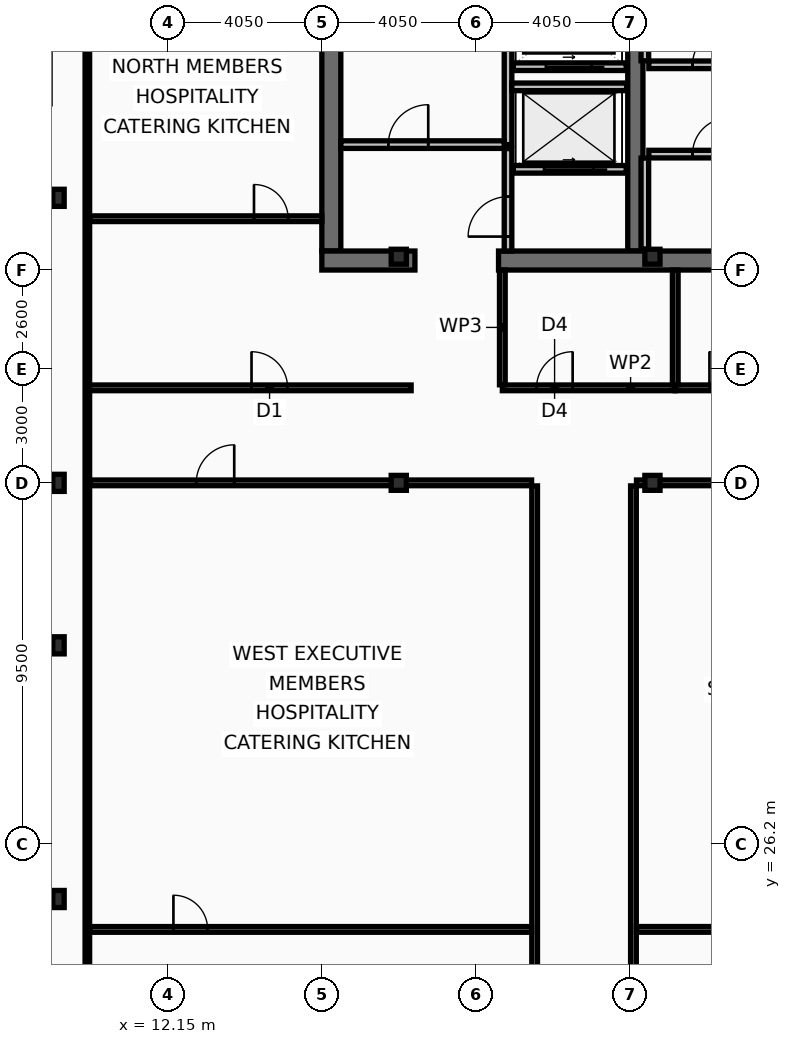
"""IFC4 building model, lengths in metres.
Left out: names, types, materials, properties, quantities, classifications, styles, units other than length and angle.
Written with IfcOpenShell. Run it as: python <this file> out.ifc"""

import sys

from ifc_helpers import new_model, si_unit, direction, frame, frame_2d, origin, origin_2d, place, context, subcontext, project, spatial, rectangle, i_section, extrude, element, fill, save


model = new_model("IFC4")
c1 = context("Model", 3, precision=1e-05, world=origin(), true_north=direction((0.0, 1.0)))
c2 = subcontext(c1, "Body", "Model", "MODEL_VIEW")
j1 = project(units=[si_unit("LENGTHUNIT", "METRE"), si_unit("PLANEANGLEUNIT", "RADIAN")], contexts=[c1])
p1 = place(None, origin())
s1 = spatial("IfcSite", under=j1, at=p1, CompositionType="ELEMENT")
p2 = place(p1, origin())
s2 = spatial("IfcBuilding", under=s1, at=p2, CompositionType="ELEMENT")
p3 = place(p2, frame((0.0, 0.0, 277.0)))
s3 = spatial("IfcBuildingStorey", under=s2, at=p3, CompositionType="ELEMENT", Elevation=277.0)
p4 = place(p3, frame((16.45, 41.8, 0.0), z_axis=(0.0, 0.0, 1.0), x_axis=(0.0, 1.0, 0.0)))
e1 = element("IfcWall", 1, at=p4, inside=s3, PredefinedType="SHEAR", context=c2, shape_type="SweptSolid", body=[
    extrude(rectangle(XDim=11.4, YDim=0.5, at=frame_2d((5.7, 0.0))), origin(), (0.0, 0.0, 1.0), 3.44),
])
p5 = place(p3, frame((24.45, 41.8, 0.0), z_axis=(0.0, 0.0, 1.0), x_axis=(0.0, 1.0, 0.0)))
e2 = element("IfcWall", 2, at=p5, inside=s3, PredefinedType="SHEAR", context=c2, shape_type="SweptSolid", body=[
    extrude(rectangle(XDim=11.4, YDim=0.4, at=frame_2d((5.7, 0.0))), origin(), (0.0, 0.0, 1.0), 3.44),
])
p6 = place(p3, frame((18.65, 41.55, 0.0), z_axis=(0.0, 0.0, 1.0), x_axis=(-1.0, 0.0, 0.0)))
e3 = element("IfcWall", 3, at=p6, inside=s3, PredefinedType="SHEAR", context=c2, shape_type="SweptSolid", body=[
    extrude(rectangle(XDim=2.45, YDim=0.5, at=frame_2d((1.225, 0.0))), origin(), (0.0, 0.0, 1.0), 3.44),
])
p7 = place(p3, frame((32.3, 41.55, 0.0), z_axis=(0.0, 0.0, 1.0), x_axis=(-1.0, 0.0, 0.0)))
e4 = element("IfcWall", 4, at=p7, inside=s3, PredefinedType="SHEAR", context=c2, shape_type="SweptSolid", body=[
    extrude(rectangle(XDim=11.45, YDim=0.5, at=frame_2d((5.725, 0.0))), origin(), (0.0, 0.0, 1.0), 3.44),
])
for number, where, z_axis, x_axis in (
    (5, (9.27, 24.75, 0.0), (0.0, 0.0, 1.0), (1.0, 0.0, 0.0)),
    (6, (9.27, 31.425, 0.0), (0.0, 0.0, 1.0), (1.0, 0.0, 0.0)),
    (7, (9.27, 35.7, 0.0), (0.0, 0.0, 1.0), (1.0, 0.0, 0.0)),
    (8, (9.27, 43.2, 0.0), (0.0, 0.0, 1.0), (1.0, 0.0, 0.0)),
):
    element("IfcColumn", number, at=place(p3, frame(where, z_axis=z_axis, x_axis=x_axis)), inside=s3, PredefinedType="COLUMN", context=c2, shape_type="SweptSolid", body=[
        extrude(i_section(OverallWidth=0.3, OverallDepth=0.45, WebThickness=0.014, FlangeThickness=0.026, at=origin_2d()), origin(), (0.0, 0.0, 1.0), 3.6),
    ])
for number, where, z_axis, x_axis in (
    (9, (18.225, 35.7, 0.0), (0.0, 0.0, 1.0), (1.0, 0.0, 0.0)),
    (10, (18.225, 41.65, 0.0), (0.0, 0.0, 1.0), (1.0, 0.0, 0.0)),
    (11, (24.9, 35.7, 0.0), (0.0, 0.0, 1.0), (1.0, 0.0, 0.0)),
    (12, (24.9, 41.65, 0.0), (0.0, 0.0, 1.0), (1.0, 0.0, 0.0)),
):
    element("IfcColumn", number, at=place(p3, frame(where, z_axis=z_axis, x_axis=x_axis)), inside=s3, PredefinedType="COLUMN", context=c2, shape_type="SweptSolid", body=[
        extrude(i_section(OverallWidth=0.399, OverallDepth=0.393, WebThickness=0.023, FlangeThickness=0.037, at=origin_2d()), origin(), (0.0, 0.0, 1.0), 3.6),
    ])
p8 = place(p3, frame((24.21, 43.95, 0.0), z_axis=(0.0, 0.0, 1.0), x_axis=(-1.0, 0.0, 0.0)))
e13 = element("IfcWall", 13, at=p8, inside=s3, PredefinedType="PARTITIONING", context=c2, shape_type="SweptSolid", body=[
    extrude(rectangle(XDim=2.97, YDim=0.2, at=frame_2d((1.485, 0.0))), origin(), (0.0, 0.0, 1.0), 3.44),
])
p9 = place(p8, frame((0.86, 0.0, 0.0)))
e14 = element("IfcOpeningElement", 14, at=p9, cuts=e13, PredefinedType="OPENING", context=c2, shape_type="SweptSolid", body=[
    extrude(rectangle(XDim=1.3, YDim=2.18, at=frame_2d((0.65, 1.09))), frame((0.0, 0.11, 0.0), z_axis=(0.0, -1.0, 0.0), x_axis=(1.0, 0.0, 0.0)), (0.0, 0.0, 1.0), 0.22),
])
p10 = place(p3, frame((24.21, 46.65, 0.0), z_axis=(0.0, 0.0, 1.0), x_axis=(-1.0, 0.0, 0.0)))
e15 = element("IfcWall", 15, at=p10, inside=s3, PredefinedType="PARTITIONING", context=c2, shape_type="SweptSolid", body=[
    extrude(rectangle(XDim=2.97, YDim=0.2, at=frame_2d((1.485, 0.0))), origin(), (0.0, 0.0, 1.0), 3.44),
])
p11 = place(p10, frame((0.91, 0.0, 0.0)))
e16 = element("IfcOpeningElement", 16, at=p11, cuts=e15, PredefinedType="OPENING", context=c2, shape_type="SweptSolid", body=[
    extrude(rectangle(XDim=1.2, YDim=2.18, at=frame_2d((0.6, 1.09))), frame((0.0, 0.11, 0.0), z_axis=(0.0, -1.0, 0.0), x_axis=(1.0, 0.0, 0.0)), (0.0, 0.0, 1.0), 0.22),
])
p12 = place(p3, frame((21.1, 44.6, 0.0), z_axis=(0.0, 0.0, 1.0), x_axis=(0.0, 1.0, 0.0)))
e17 = element("IfcWall", 17, at=p12, inside=s3, PredefinedType="PARTITIONING", context=c2, shape_type="SweptSolid", body=[
    extrude(rectangle(XDim=4.3, YDim=0.2, at=frame_2d((2.15, 0.0))), origin(), (0.0, 0.0, 1.0), 3.44),
])
p13 = place(p3, frame((16.7, 44.6, 0.0), z_axis=(0.0, 0.0, 1.0), x_axis=(1.0, 0.0, 0.0)))
e18 = element("IfcWall", 18, at=p13, inside=s3, PredefinedType="PARTITIONING", context=c2, shape_type="SweptSolid", body=[
    extrude(rectangle(XDim=4.3, YDim=0.2, at=frame_2d((2.15, 0.0))), origin(), (0.0, 0.0, 1.0), 3.44),
])
p14 = place(p13, frame((1.25, 0.0, 0.0)))
e19 = element("IfcOpeningElement", 19, at=p14, cuts=e18, PredefinedType="OPENING", context=c2, shape_type="SweptSolid", body=[
    extrude(rectangle(XDim=1.05, YDim=2.15, at=frame_2d((0.525, 1.075))), frame((0.0, 0.11, 0.0), z_axis=(0.0, -1.0, 0.0), x_axis=(1.0, 0.0, 0.0)), (0.0, 0.0, 1.0), 0.22),
])
p15 = place(p3, frame((21.2, 46.12, 0.0), z_axis=(0.0, 0.0, 1.0), x_axis=(1.0, 0.0, 0.0)))
e20 = element("IfcWall", 20, at=p15, inside=s3, PredefinedType="PARTITIONING", context=c2, shape_type="SweptSolid", body=[
    extrude(rectangle(XDim=3.02, YDim=0.2, at=frame_2d((1.51, 0.0))), origin(), (0.0, 0.0, 1.0), 3.44),
])
p16 = place(p3, frame((21.1, 41.8, 0.0), z_axis=(0.0, 0.0, 1.0), x_axis=(0.0, 1.0, 0.0)))
e21 = element("IfcWall", 21, at=p16, inside=s3, PredefinedType="PARTITIONING", context=c2, shape_type="SweptSolid", body=[
    extrude(rectangle(XDim=2.695, YDim=0.2, at=frame_2d((1.348, 0.0))), origin(), (0.0, 0.0, 1.0), 3.44),
])
p17 = place(p16, frame((0.38, 0.0, 0.0)))
e22 = element("IfcOpeningElement", 22, at=p17, cuts=e21, PredefinedType="OPENING", context=c2, shape_type="SweptSolid", body=[
    extrude(rectangle(XDim=1.05, YDim=2.15, at=frame_2d((0.525, 1.075))), frame((0.0, 0.11, 0.0), z_axis=(0.0, -1.0, 0.0), x_axis=(1.0, 0.0, 0.0)), (0.0, 0.0, 1.0), 0.22),
])
p18 = place(p3, frame((24.7, 46.805, 0.0), z_axis=(0.0, 0.0, 1.0), x_axis=(0.0, 1.0, 0.0)))
e23 = element("IfcWall", 23, at=p18, inside=s3, PredefinedType="PARTITIONING", context=c2, shape_type="SweptSolid", body=[
    extrude(rectangle(XDim=5.99, YDim=0.2, at=frame_2d((2.995, 0.0))), origin(), (0.0, 0.0, 1.0), 3.44),
])
p19 = place(p3, frame((24.805, 46.7, 0.0), z_axis=(0.0, 0.0, 1.0), x_axis=(1.0, 0.0, 0.0)))
e24 = element("IfcWall", 24, at=p19, inside=s3, PredefinedType="PARTITIONING", context=c2, shape_type="SweptSolid", body=[
    extrude(rectangle(XDim=7.51, YDim=0.2, at=frame_2d((3.755, 0.0))), origin(), (0.0, 0.0, 1.0), 3.44),
])
p20 = place(p19, frame((1.15, 0.0, 0.0)))
e25 = element("IfcOpeningElement", 25, at=p20, cuts=e24, PredefinedType="OPENING", context=c2, shape_type="SweptSolid", body=[
    extrude(rectangle(XDim=0.95, YDim=2.1, at=frame_2d((0.475, 1.05))), frame((0.0, 0.11, 0.0), z_axis=(0.0, -1.0, 0.0), x_axis=(1.0, 0.0, 0.0)), (0.0, 0.0, 1.0), 0.22),
])
p21 = place(p19, frame((5.336, 0.0, 0.0)))
e26 = element("IfcOpeningElement", 26, at=p21, cuts=e24, PredefinedType="OPENING", context=c2, shape_type="SweptSolid", body=[
    extrude(rectangle(XDim=0.95, YDim=2.1, at=frame_2d((0.475, 1.05))), frame((0.0, 0.11, 0.0), z_axis=(0.0, -1.0, 0.0), x_axis=(1.0, 0.0, 0.0)), (0.0, 0.0, 1.0), 0.22),
])
p22 = place(p3, frame((24.7, 41.85, 0.0), z_axis=(0.0, 0.0, 1.0), x_axis=(0.0, 1.0, 0.0)))
e27 = element("IfcWall", 27, at=p22, inside=s3, PredefinedType="PARTITIONING", context=c2, shape_type="SweptSolid", body=[
    extrude(rectangle(XDim=2.395, YDim=0.2, at=frame_2d((1.198, 0.0))), origin(), (0.0, 0.0, 1.0), 3.44),
])
p23 = place(p3, frame((24.805, 44.35, 0.0), z_axis=(0.0, 0.0, 1.0), x_axis=(1.0, 0.0, 0.0)))
e28 = element("IfcWall", 28, at=p23, inside=s3, PredefinedType="PARTITIONING", context=c2, shape_type="SweptSolid", body=[
    extrude(rectangle(XDim=7.34, YDim=0.2, at=frame_2d((3.67, 0.0))), origin(), (0.0, 0.0, 1.0), 3.44),
])
p24 = place(p23, frame((1.15, 0.0, 0.0)))
e29 = element("IfcOpeningElement", 29, at=p24, cuts=e28, PredefinedType="OPENING", context=c2, shape_type="SweptSolid", body=[
    extrude(rectangle(XDim=0.95, YDim=2.1, at=frame_2d((0.475, 1.05))), frame((0.0, 0.11, 0.0), z_axis=(0.0, -1.0, 0.0), x_axis=(1.0, 0.0, 0.0)), (0.0, 0.0, 1.0), 0.22),
])
p25 = place(p23, frame((5.231, 0.0, 0.0)))
e30 = element("IfcOpeningElement", 30, at=p25, cuts=e28, PredefinedType="OPENING", context=c2, shape_type="SweptSolid", body=[
    extrude(rectangle(XDim=0.95, YDim=2.1, at=frame_2d((0.475, 1.05))), frame((0.0, 0.11, 0.0), z_axis=(0.0, -1.0, 0.0), x_axis=(1.0, 0.0, 0.0)), (0.0, 0.0, 1.0), 0.22),
])
p26 = place(p3, frame((20.95, 38.2, 0.0), z_axis=(0.0, 0.0, 1.0), x_axis=(1.0, 0.0, 0.0)))
e31 = element("IfcWall", 31, at=p26, inside=s3, PredefinedType="PARTITIONING", context=c2, shape_type="SweptSolid", body=[
    extrude(rectangle(XDim=4.55, YDim=0.15, at=frame_2d((2.275, 0.0))), origin(), (0.0, 0.0, 1.0), 2.78),
])
p27 = place(p26, frame((0.9, 0.0, 0.0)))
e32 = element("IfcOpeningElement", 32, at=p27, cuts=e31, PredefinedType="OPENING", context=c2, shape_type="SweptSolid", body=[
    extrude(rectangle(XDim=0.95, YDim=2.05, at=frame_2d((0.475, 1.025))), frame((0.0, 0.085, 0.0), z_axis=(0.0, -1.0, 0.0), x_axis=(1.0, 0.0, 0.0)), (0.0, 0.0, 1.0), 0.17),
])
p28 = place(p3, frame((25.5, 38.2, 0.0), z_axis=(0.0, 0.0, 1.0), x_axis=(1.0, 0.0, 0.0)))
e33 = element("IfcWall", 33, at=p28, inside=s3, PredefinedType="PARTITIONING", context=c2, shape_type="SweptSolid", body=[
    extrude(rectangle(XDim=2.9, YDim=0.15, at=frame_2d((1.45, 0.0))), origin(), (0.0, 0.0, 1.0), 3.44),
])
p29 = place(p28, frame((0.9, 0.0, 0.0)))
e34 = element("IfcOpeningElement", 34, at=p29, cuts=e33, PredefinedType="OPENING", context=c2, shape_type="SweptSolid", body=[
    extrude(rectangle(XDim=0.95, YDim=2.05, at=frame_2d((0.475, 1.025))), frame((0.0, 0.085, 0.0), z_axis=(0.0, -1.0, 0.0), x_axis=(1.0, 0.0, 0.0)), (0.0, 0.0, 1.0), 0.17),
])
for number, where, z_axis, x_axis in (
    (35, (20.95, 38.28, 0.0), (0.0, 0.0, 1.0), (0.0, 1.0, 0.0)),
    (36, (25.5, 38.28, 0.0), (0.0, 0.0, 1.0), (0.0, 1.0, 0.0)),
):
    element("IfcWall", number, at=place(p3, frame(where, z_axis=z_axis, x_axis=x_axis)), inside=s3, PredefinedType="PARTITIONING", context=c2, shape_type="SweptSolid", body=[
        extrude(rectangle(XDim=3.02, YDim=0.15, at=frame_2d((1.51, 0.0))), origin(), (0.0, 0.0, 1.0), 3.44),
    ])
p30 = place(p3, frame((10.03, 38.2, 0.0), z_axis=(0.0, 0.0, 1.0), x_axis=(1.0, 0.0, 0.0)))
e37 = element("IfcWall", 37, at=p30, inside=s3, PredefinedType="PARTITIONING", context=c2, shape_type="SweptSolid", body=[
    extrude(rectangle(XDim=8.52, YDim=0.15, at=frame_2d((4.26, 0.0))), origin(), (0.0, 0.0, 1.0), 2.78),
])
p31 = place(p30, frame((4.32, 0.0, 0.0)))
e38 = element("IfcOpeningElement", 38, at=p31, cuts=e37, PredefinedType="OPENING", context=c2, shape_type="SweptSolid", body=[
    extrude(rectangle(XDim=0.95, YDim=2.05, at=frame_2d((0.475, 1.025))), frame((0.0, 0.085, 0.0), z_axis=(0.0, -1.0, 0.0), x_axis=(1.0, 0.0, 0.0)), (0.0, 0.0, 1.0), 0.17),
])
p32 = place(p3, frame((10.095, 42.65, 0.0), z_axis=(0.0, 0.0, 1.0), x_axis=(1.0, 0.0, 0.0)))
e39 = element("IfcWall", 39, at=p32, inside=s3, PredefinedType="PARTITIONING", context=c2, shape_type="SweptSolid", body=[
    extrude(rectangle(XDim=6.105, YDim=0.15, at=frame_2d((3.052, 0.0))), origin(), (0.0, 0.0, 1.0), 2.78),
])
p33 = place(p32, frame((4.32, 0.0, 0.0)))
e40 = element("IfcOpeningElement", 40, at=p33, cuts=e39, PredefinedType="OPENING", context=c2, shape_type="SweptSolid", body=[
    extrude(rectangle(XDim=0.9, YDim=2.05, at=frame_2d((0.45, 1.025))), frame((0.0, 0.085, 0.0), z_axis=(0.0, -1.0, 0.0), x_axis=(1.0, 0.0, 0.0)), (0.0, 0.0, 1.0), 0.17),
])
p34 = place(p3, frame((21.8, 10.665, 0.0), z_axis=(0.0, 0.0, 1.0), x_axis=(0.0, 1.0, 0.0)))
e41 = element("IfcWall", 41, at=p34, inside=s3, PredefinedType="PARTITIONING", context=c2, shape_type="SweptSolid", body=[
    extrude(rectangle(XDim=24.955, YDim=0.15, at=frame_2d((12.478, 0.0))), origin(), (0.0, 0.0, 1.0), 3.03),
])
p35 = place(p34, frame((3.4, 0.0, 0.0)))
e42 = element("IfcOpeningElement", 42, at=p35, cuts=e41, PredefinedType="OPENING", context=c2, shape_type="SweptSolid", body=[
    extrude(rectangle(XDim=1.1, YDim=2.1, at=frame_2d((0.55, 1.05))), frame((0.0, 0.085, 0.0), z_axis=(0.0, -1.0, 0.0), x_axis=(1.0, 0.0, 0.0)), (0.0, 0.0, 1.0), 0.17),
])
p36 = place(p3, frame((10.095, 35.7, 0.0), z_axis=(0.0, 0.0, 1.0), x_axis=(1.0, 0.0, 0.0)))
e43 = element("IfcWall", 43, at=p36, inside=s3, PredefinedType="PARTITIONING", context=c2, shape_type="SweptSolid", body=[
    extrude(rectangle(XDim=11.625, YDim=0.15, at=frame_2d((5.812, 0.0))), origin(), (0.0, 0.0, 1.0), 2.78),
])
p37 = place(p36, frame((2.8, 0.0, 0.0)))
e44 = element("IfcOpeningElement", 44, at=p37, cuts=e43, PredefinedType="OPENING", context=c2, shape_type="SweptSolid", body=[
    extrude(rectangle(XDim=1.0, YDim=2.05, at=frame_2d((0.5, 1.025))), frame((0.0, 0.085, 0.0), z_axis=(0.0, -1.0, 0.0), x_axis=(1.0, 0.0, 0.0)), (0.0, 0.0, 1.0), 0.17),
])
p38 = place(p3, frame((10.095, 23.95, 0.0), z_axis=(0.0, 0.0, 1.0), x_axis=(1.0, 0.0, 0.0)))
e45 = element("IfcWall", 45, at=p38, inside=s3, PredefinedType="PARTITIONING", context=c2, shape_type="SweptSolid", body=[
    extrude(rectangle(XDim=11.625, YDim=0.15, at=frame_2d((5.812, 0.0))), origin(), (0.0, 0.0, 1.0), 2.78),
])
p39 = place(p38, frame((2.2, 0.0, 0.0)))
e46 = element("IfcOpeningElement", 46, at=p39, cuts=e45, PredefinedType="OPENING", context=c2, shape_type="SweptSolid", body=[
    extrude(rectangle(XDim=0.9, YDim=2.05, at=frame_2d((0.45, 1.025))), frame((0.0, 0.085, 0.0), z_axis=(0.0, -1.0, 0.0), x_axis=(1.0, 0.0, 0.0)), (0.0, 0.0, 1.0), 0.17),
])
p40 = place(p3, frame((24.4, 18.135, 0.0), z_axis=(0.0, 0.0, 1.0), x_axis=(0.0, 1.0, 0.0)))
e47 = element("IfcWall", 47, at=p40, inside=s3, PredefinedType="PARTITIONING", context=c2, shape_type="SweptSolid", body=[
    extrude(rectangle(XDim=17.485, YDim=0.15, at=frame_2d((8.743, 0.0))), origin(), (0.0, 0.0, 1.0), 2.78),
])
p41 = place(p3, frame((24.48, 35.7, 0.0), z_axis=(0.0, 0.0, 1.0), x_axis=(1.0, 0.0, 0.0)))
e48 = element("IfcWall", 48, at=p41, inside=s3, PredefinedType="PARTITIONING", context=c2, shape_type="SweptSolid", body=[
    extrude(rectangle(XDim=25.02, YDim=0.15, at=frame_2d((12.51, 0.0))), origin(), (0.0, 0.0, 1.0), 2.78),
])
p42 = place(p3, frame((24.48, 23.951, 0.0), z_axis=(0.0, 0.0, 1.0), x_axis=(1.0, 0.0, 0.0)))
e49 = element("IfcWall", 49, at=p42, inside=s3, PredefinedType="PARTITIONING", context=c2, shape_type="SweptSolid", body=[
    extrude(rectangle(XDim=8.36, YDim=0.15, at=frame_2d((4.18, 0.0))), origin(), (0.0, 0.0, 1.0), 2.78),
])
p43 = place(p42, frame((3.834, 0.0, 0.0)))
e50 = element("IfcOpeningElement", 50, at=p43, cuts=e49, PredefinedType="OPENING", context=c2, shape_type="SweptSolid", body=[
    extrude(rectangle(XDim=0.9, YDim=2.05, at=frame_2d((0.45, 1.025))), frame((0.0, 0.085, 0.0), z_axis=(0.0, -1.0, 0.0), x_axis=(1.0, 0.0, 0.0)), (0.0, 0.0, 1.0), 0.17),
])
p44 = place(p3, frame((10.03, 10.665, 0.0), z_axis=(0.0, 0.0, 1.0), x_axis=(0.0, 1.0, 0.0)))
e51 = element("IfcWall", 51, at=p44, inside=s3, PredefinedType="PARTITIONING", context=c2, shape_type="SweptSolid", body=[
    extrude(rectangle(XDim=42.11, YDim=0.12, at=frame_2d((21.055, 0.0))), origin(), (0.0, 0.0, 1.0), 2.78),
])
p45 = place(p9, origin())
e52 = element("IfcDoor", 52, at=p45, inside=s3, OperationType="SLIDING_TO_LEFT", PredefinedType="DOOR", context=c2, shape_type="SweptSolid", body=[
    extrude(rectangle(XDim=1.3, YDim=2.18, at=frame_2d((0.65, 1.09))), frame((0.0, 0.025, 0.0), z_axis=(0.0, -1.0, 0.0), x_axis=(1.0, 0.0, 0.0)), (0.0, 0.0, 1.0), 0.05),
])
fill(e14, e52)
p46 = place(p11, origin())
e53 = element("IfcDoor", 53, at=p46, inside=s3, OperationType="SLIDING_TO_LEFT", PredefinedType="DOOR", context=c2, shape_type="SweptSolid", body=[
    extrude(rectangle(XDim=1.2, YDim=2.18, at=frame_2d((0.6, 1.09))), frame((0.0, 0.025, 0.0), z_axis=(0.0, -1.0, 0.0), x_axis=(1.0, 0.0, 0.0)), (0.0, 0.0, 1.0), 0.05),
])
fill(e16, e53)
p47 = place(p14, origin())
e54 = element("IfcDoor", 54, at=p47, inside=s3, OperationType="SINGLE_SWING_RIGHT", PredefinedType="DOOR", context=c2, shape_type="SweptSolid", body=[
    extrude(rectangle(XDim=1.05, YDim=2.15, at=frame_2d((0.525, 1.075))), frame((0.0, 0.025, 0.0), z_axis=(0.0, -1.0, 0.0), x_axis=(1.0, 0.0, 0.0)), (0.0, 0.0, 1.0), 0.05),
])
fill(e19, e54)
p48 = place(p17, origin())
e55 = element("IfcDoor", 55, at=p48, inside=s3, OperationType="SINGLE_SWING_LEFT", PredefinedType="DOOR", context=c2, shape_type="SweptSolid", body=[
    extrude(rectangle(XDim=1.05, YDim=2.15, at=frame_2d((0.525, 1.075))), frame((0.0, 0.025, 0.0), z_axis=(0.0, -1.0, 0.0), x_axis=(1.0, 0.0, 0.0)), (0.0, 0.0, 1.0), 0.05),
])
fill(e22, e55)
p49 = place(p20, origin())
e56 = element("IfcDoor", 56, at=p49, inside=s3, OperationType="SINGLE_SWING_RIGHT", PredefinedType="DOOR", context=c2, shape_type="SweptSolid", body=[
    extrude(rectangle(XDim=0.95, YDim=2.1, at=frame_2d((0.475, 1.05))), frame((0.0, 0.025, 0.0), z_axis=(0.0, -1.0, 0.0), x_axis=(1.0, 0.0, 0.0)), (0.0, 0.0, 1.0), 0.05),
])
fill(e25, e56)
p50 = place(p24, origin())
e57 = element("IfcDoor", 57, at=p50, inside=s3, OperationType="SINGLE_SWING_RIGHT", PredefinedType="DOOR", context=c2, shape_type="SweptSolid", body=[
    extrude(rectangle(XDim=0.95, YDim=2.1, at=frame_2d((0.475, 1.05))), frame((0.0, 0.025, 0.0), z_axis=(0.0, -1.0, 0.0), x_axis=(1.0, 0.0, 0.0)), (0.0, 0.0, 1.0), 0.05),
])
fill(e29, e57)
p51 = place(p27, origin())
e58 = element("IfcDoor", 58, at=p51, inside=s3, OperationType="SINGLE_SWING_RIGHT", PredefinedType="DOOR", context=c2, shape_type="SweptSolid", body=[
    extrude(rectangle(XDim=0.95, YDim=2.05, at=frame_2d((0.475, 1.025))), frame((0.0, 0.025, 0.0), z_axis=(0.0, -1.0, 0.0), x_axis=(1.0, 0.0, 0.0)), (0.0, 0.0, 1.0), 0.05),
])
fill(e32, e58)
p52 = place(p29, origin())
e59 = element("IfcDoor", 59, at=p52, inside=s3, OperationType="SINGLE_SWING_LEFT", PredefinedType="DOOR", context=c2, shape_type="SweptSolid", body=[
    extrude(rectangle(XDim=0.95, YDim=2.05, at=frame_2d((0.475, 1.025))), frame((0.0, 0.025, 0.0), z_axis=(0.0, -1.0, 0.0), x_axis=(1.0, 0.0, 0.0)), (0.0, 0.0, 1.0), 0.05),
])
fill(e34, e59)
p53 = place(p31, origin())
e60 = element("IfcDoor", 60, at=p53, inside=s3, OperationType="SINGLE_SWING_LEFT", PredefinedType="DOOR", context=c2, shape_type="SweptSolid", body=[
    extrude(rectangle(XDim=0.95, YDim=2.05, at=frame_2d((0.475, 1.025))), frame((0.0, 0.025, 0.0), z_axis=(0.0, -1.0, 0.0), x_axis=(1.0, 0.0, 0.0)), (0.0, 0.0, 1.0), 0.05),
])
fill(e38, e60)
p54 = place(p33, origin())
e61 = element("IfcDoor", 61, at=p54, inside=s3, OperationType="SINGLE_SWING_LEFT", PredefinedType="DOOR", context=c2, shape_type="SweptSolid", body=[
    extrude(rectangle(XDim=0.9, YDim=2.05, at=frame_2d((0.45, 1.025))), frame((0.0, 0.025, 0.0), z_axis=(0.0, -1.0, 0.0), x_axis=(1.0, 0.0, 0.0)), (0.0, 0.0, 1.0), 0.05),
])
fill(e40, e61)
p55 = place(p37, origin())
e62 = element("IfcDoor", 62, at=p55, inside=s3, OperationType="SINGLE_SWING_RIGHT", PredefinedType="DOOR", context=c2, shape_type="SweptSolid", body=[
    extrude(rectangle(XDim=1.0, YDim=2.05, at=frame_2d((0.5, 1.025))), frame((0.0, 0.025, 0.0), z_axis=(0.0, -1.0, 0.0), x_axis=(1.0, 0.0, 0.0)), (0.0, 0.0, 1.0), 0.05),
])
fill(e44, e62)
p56 = place(p39, origin())
e63 = element("IfcDoor", 63, at=p56, inside=s3, OperationType="SINGLE_SWING_LEFT", PredefinedType="DOOR", context=c2, shape_type="SweptSolid", body=[
    extrude(rectangle(XDim=0.9, YDim=2.05, at=frame_2d((0.45, 1.025))), frame((0.0, 0.025, 0.0), z_axis=(0.0, -1.0, 0.0), x_axis=(1.0, 0.0, 0.0)), (0.0, 0.0, 1.0), 0.05),
])
fill(e46, e63)
save(model, sys.argv[1])
